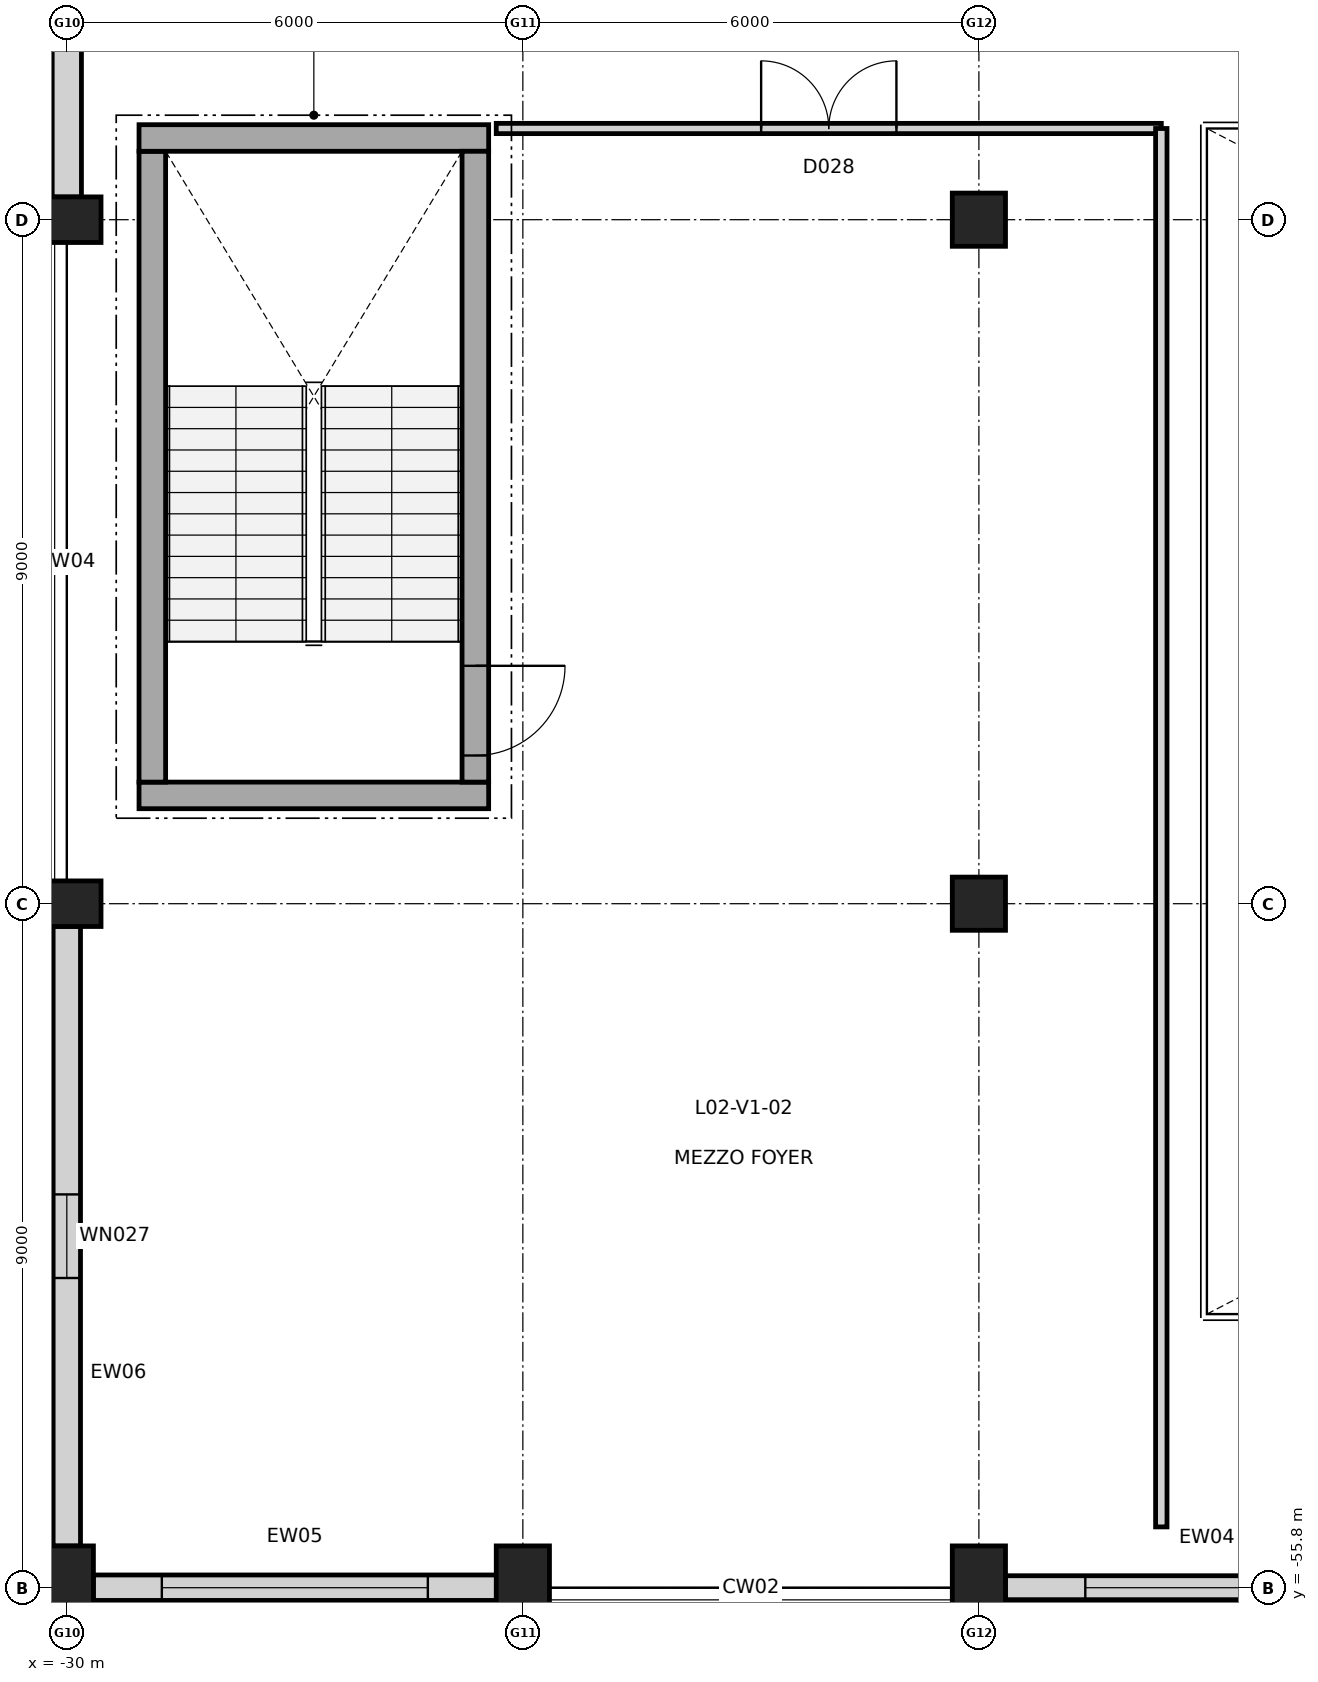
"""IFC4 building model, lengths in metres.
Left out: names, types, materials, properties, quantities, classifications, styles, units other than length and angle.
Written with IfcOpenShell. Run it as: python <this file> out.ifc"""

import sys

from ifc_helpers import new_model, si_unit, direction, frame, frame_2d, origin, origin_2d, place, context, subcontext, project, spatial, rectangle, circle, extrude, element, fill, save


model = new_model("IFC4")
c1 = context("Model", 3, precision=1e-05, world=origin(), true_north=direction((0.0, 1.0)))
c2 = subcontext(c1, "Body", "Model", "MODEL_VIEW")
j1 = project(units=[si_unit("LENGTHUNIT", "METRE"), si_unit("PLANEANGLEUNIT", "RADIAN")], contexts=[c1])
p1 = place(None, origin())
s1 = spatial("IfcSite", under=j1, at=p1, CompositionType="ELEMENT")
p2 = place(p1, origin())
s2 = spatial("IfcBuilding", under=s1, at=p2, CompositionType="ELEMENT")
p3 = place(p2, frame((0.0, 0.0, 10.2)))
s3 = spatial("IfcBuildingStorey", under=s2, at=p3, CompositionType="ELEMENT", Elevation=10.2)
p4 = place(p3, frame((-30.0, -55.8, 0.0), z_axis=(0.0, 0.0, 1.0), x_axis=(1.0, 0.0, 0.0)))
e1 = element("IfcColumn", 1, at=p4, inside=s3, PredefinedType="COLUMN", context=c2, shape_type="SweptSolid", body=[
    extrude(rectangle(XDim=0.7, YDim=1.1, at=origin_2d()), origin(), (0.0, 0.0, 1.0), 4.8),
])
for number, where, z_axis, x_axis in (
    (2, (-30.0, -46.8, 0.0), (0.0, 0.0, 1.0), (0.0, 1.0, 0.0)),
    (3, (-30.0, -37.8, 0.0), (0.0, 0.0, 1.0), (0.0, 1.0, 0.0)),
):
    element("IfcColumn", number, at=place(p3, frame(where, z_axis=z_axis, x_axis=x_axis)), inside=s3, PredefinedType="COLUMN", context=c2, shape_type="SweptSolid", body=[
        extrude(rectangle(XDim=0.6, YDim=0.9, at=origin_2d()), origin(), (0.0, 0.0, 1.0), 4.8),
    ])
for number, where, z_axis, x_axis in (
    (4, (-24.0, -55.8, 0.0), (0.0, 0.0, 1.0), (1.0, 0.0, 0.0)),
    (5, (-18.0, -55.8, 0.0), (0.0, 0.0, 1.0), (1.0, 0.0, 0.0)),
):
    element("IfcColumn", number, at=place(p3, frame(where, z_axis=z_axis, x_axis=x_axis)), inside=s3, PredefinedType="COLUMN", context=c2, shape_type="SweptSolid", body=[
        extrude(rectangle(XDim=0.7, YDim=1.1, at=origin_2d()), origin(), (0.0, 0.0, 1.0), 4.8),
    ])
for number, where, z_axis, x_axis in (
    (6, (-18.0, -46.8, 0.0), (0.0, 0.0, 1.0), (1.0, 0.0, 0.0)),
    (7, (-18.0, -37.8, 0.0), (0.0, 0.0, 1.0), (1.0, 0.0, 0.0)),
):
    element("IfcColumn", number, at=place(p3, frame(where, z_axis=z_axis, x_axis=x_axis)), inside=s3, PredefinedType="COLUMN", context=c2, shape_type="SweptSolid", body=[
        extrude(circle(Radius=0.35, at=origin_2d()), origin(), (0.0, 0.0, 1.0), 4.8),
    ])
p5 = place(p3, frame((-12.348, -55.8, 0.0), z_axis=(0.0, 0.0, 1.0), x_axis=(-1.0, 0.0, 0.0)))
e8 = element("IfcWall", 8, at=p5, inside=s3, PredefinedType="STANDARD", context=c2, shape_type="SweptSolid", body=[
    extrude(rectangle(XDim=5.304, YDim=0.315, at=frame_2d((2.652, 0.0))), origin(), (0.0, 0.0, 1.0), 3.745),
])
p6 = place(p5, frame((1.052, 0.0, 0.85)))
e9 = element("IfcOpeningElement", 9, at=p6, cuts=e8, PredefinedType="OPENING", context=c2, shape_type="SweptSolid", body=[
    extrude(rectangle(XDim=3.2, YDim=1.45, at=frame_2d((1.6, 0.725))), frame((0.0, 0.167, 0.0), z_axis=(0.0, -1.0, 0.0), x_axis=(1.0, 0.0, 0.0)), (0.0, 0.0, 1.0), 0.335),
])
p7 = place(p3, frame((-24.348, -55.8, 0.0), z_axis=(0.0, 0.0, 1.0), x_axis=(-1.0, 0.0, 0.0)))
e10 = element("IfcWall", 10, at=p7, inside=s3, PredefinedType="STANDARD", context=c2, shape_type="SweptSolid", body=[
    extrude(rectangle(XDim=5.304, YDim=0.335, at=frame_2d((2.652, 0.0))), origin(), (0.0, 0.0, 1.0), 3.745),
])
p8 = place(p7, frame((0.902, 0.0, 0.85)))
e11 = element("IfcOpeningElement", 11, at=p8, cuts=e10, PredefinedType="OPENING", context=c2, shape_type="SweptSolid", body=[
    extrude(rectangle(XDim=3.5, YDim=1.45, at=frame_2d((1.75, 0.725))), frame((0.0, 0.177, 0.0), z_axis=(0.0, -1.0, 0.0), x_axis=(1.0, 0.0, 0.0)), (0.0, 0.0, 1.0), 0.355),
])
p9 = place(p3, frame((-30.0, -55.252, 0.0), z_axis=(0.0, 0.0, 1.0), x_axis=(0.0, 1.0, 0.0)))
e12 = element("IfcWall", 12, at=p9, inside=s3, PredefinedType="STANDARD", context=c2, shape_type="SweptSolid", body=[
    extrude(rectangle(XDim=8.154, YDim=0.36, at=frame_2d((4.077, 0.0))), origin(), (0.0, 0.0, 1.0), 3.829),
])
p10 = place(p9, frame((3.527, 0.0, 0.85)))
e13 = element("IfcOpeningElement", 13, at=p10, cuts=e12, PredefinedType="OPENING", context=c2, shape_type="SweptSolid", body=[
    extrude(rectangle(XDim=1.1, YDim=1.6, at=frame_2d((0.55, 0.8))), frame((0.0, 0.19, 0.0), z_axis=(0.0, -1.0, 0.0), x_axis=(1.0, 0.0, 0.0)), (0.0, 0.0, 1.0), 0.38),
])
p11 = place(p3, frame((-30.0, -37.502, 0.0), z_axis=(0.0, 0.0, 1.0), x_axis=(0.0, 1.0, 0.0)))
e14 = element("IfcWall", 14, at=p11, inside=s3, PredefinedType="STANDARD", context=c2, shape_type="SweptSolid", body=[
    extrude(rectangle(XDim=8.404, YDim=0.385, at=frame_2d((4.202, 0.0))), origin(), (0.0, 0.0, 1.0), 3.829),
])
p12 = place(p11, frame((3.577, 0.0, 0.85)))
e15 = element("IfcOpeningElement", 15, at=p12, cuts=e14, PredefinedType="OPENING", context=c2, shape_type="SweptSolid", body=[
    extrude(rectangle(XDim=1.25, YDim=1.6, at=frame_2d((0.625, 0.8))), frame((0.0, 0.202, 0.0), z_axis=(0.0, -1.0, 0.0), x_axis=(1.0, 0.0, 0.0)), (0.0, 0.0, 1.0), 0.405),
])
p13 = place(p3, frame((-24.45, -45.375, 0.0), z_axis=(0.0, 0.0, 1.0), x_axis=(-1.0, 0.0, 0.0)))
e16 = element("IfcWall", 16, at=p13, inside=s3, PredefinedType="SHEAR", context=c2, shape_type="SweptSolid", body=[
    extrude(rectangle(XDim=4.6, YDim=0.35, at=frame_2d((2.3, 0.0))), origin(), (0.0, 0.0, 1.0), 4.8),
])
p14 = place(p3, frame((-28.875, -45.2, 0.0), z_axis=(0.0, 0.0, 1.0), x_axis=(0.0, 1.0, 0.0)))
e17 = element("IfcWall", 17, at=p14, inside=s3, PredefinedType="SHEAR", context=c2, shape_type="SweptSolid", body=[
    extrude(rectangle(XDim=8.3, YDim=0.35, at=frame_2d((4.15, 0.0))), origin(), (0.0, 0.0, 1.0), 4.8),
])
p15 = place(p3, frame((-29.05, -36.725, 0.0), z_axis=(0.0, 0.0, 1.0), x_axis=(1.0, 0.0, 0.0)))
e18 = element("IfcWall", 18, at=p15, inside=s3, PredefinedType="SHEAR", context=c2, shape_type="SweptSolid", body=[
    extrude(rectangle(XDim=4.6, YDim=0.35, at=frame_2d((2.3, 0.0))), origin(), (0.0, 0.0, 1.0), 4.8),
])
p16 = place(p3, frame((-24.625, -36.9, 0.0), z_axis=(0.0, 0.0, 1.0), x_axis=(0.0, -1.0, 0.0)))
e19 = element("IfcWall", 19, at=p16, inside=s3, PredefinedType="SHEAR", context=c2, shape_type="SweptSolid", body=[
    extrude(rectangle(XDim=8.3, YDim=0.35, at=frame_2d((4.15, 0.0))), origin(), (0.0, 0.0, 1.0), 4.8),
])
p17 = place(p16, frame((6.77, 0.0, 0.0)))
e20 = element("IfcOpeningElement", 20, at=p17, cuts=e19, PredefinedType="OPENING", context=c2, shape_type="SweptSolid", body=[
    extrude(rectangle(XDim=1.18, YDim=2.15, at=frame_2d((0.59, 1.075))), frame((0.0, 0.185, 0.0), z_axis=(0.0, -1.0, 0.0), x_axis=(1.0, 0.0, 0.0)), (0.0, 0.0, 1.0), 0.37),
])
p18 = place(p3, frame((-24.35, -36.6, 0.0), z_axis=(0.0, 0.0, 1.0), x_axis=(1.0, 0.0, 0.0)))
e21 = element("IfcWall", 21, at=p18, inside=s3, PredefinedType="PARTITIONING", context=c2, shape_type="SweptSolid", body=[
    extrude(rectangle(XDim=8.75, YDim=0.135, at=frame_2d((4.375, 0.0))), origin(), (0.0, 0.0, 1.0), 4.42),
])
p19 = place(p18, frame((3.485, 0.0, 0.0)))
e22 = element("IfcOpeningElement", 22, at=p19, cuts=e21, PredefinedType="OPENING", context=c2, shape_type="SweptSolid", body=[
    extrude(rectangle(XDim=1.78, YDim=2.3, at=frame_2d((0.89, 1.15))), frame((0.0, 0.077, 0.0), z_axis=(0.0, -1.0, 0.0), x_axis=(1.0, 0.0, 0.0)), (0.0, 0.0, 1.0), 0.155),
])
p20 = place(p3, frame((-15.6, -55.0, 0.0), z_axis=(0.0, 0.0, 1.0), x_axis=(0.0, 1.0, 0.0)))
e23 = element("IfcWall", 23, at=p20, inside=s3, PredefinedType="PARTITIONING", context=c2, shape_type="SweptSolid", body=[
    extrude(rectangle(XDim=18.4, YDim=0.15, at=frame_2d((9.2, 0.0))), origin(), (0.0, 0.0, 1.0), 4.42),
])
p21 = place(p6, origin())
e24 = element("IfcWindow", 24, at=p21, inside=s3, PartitioningType="SINGLE_PANEL", PredefinedType="WINDOW", context=c2, shape_type="SweptSolid", body=[
    extrude(rectangle(XDim=3.2, YDim=1.45, at=frame_2d((1.6, 0.725))), frame((0.0, 0.03, 0.0), z_axis=(0.0, -1.0, 0.0), x_axis=(1.0, 0.0, 0.0)), (0.0, 0.0, 1.0), 0.06),
])
fill(e9, e24)
p22 = place(p8, origin())
e25 = element("IfcWindow", 25, at=p22, inside=s3, PartitioningType="SINGLE_PANEL", PredefinedType="WINDOW", context=c2, shape_type="SweptSolid", body=[
    extrude(rectangle(XDim=3.5, YDim=1.45, at=frame_2d((1.75, 0.725))), frame((0.0, 0.03, 0.0), z_axis=(0.0, -1.0, 0.0), x_axis=(1.0, 0.0, 0.0)), (0.0, 0.0, 1.0), 0.06),
])
fill(e11, e25)
p23 = place(p10, origin())
e26 = element("IfcWindow", 26, at=p23, inside=s3, PartitioningType="SINGLE_PANEL", PredefinedType="WINDOW", context=c2, shape_type="SweptSolid", body=[
    extrude(rectangle(XDim=1.1, YDim=1.6, at=frame_2d((0.55, 0.8))), frame((0.0, 0.03, 0.0), z_axis=(0.0, -1.0, 0.0), x_axis=(1.0, 0.0, 0.0)), (0.0, 0.0, 1.0), 0.06),
])
fill(e13, e26)
p24 = place(p17, origin())
e27 = element("IfcDoor", 27, at=p24, inside=s3, OperationType="SINGLE_SWING_LEFT", PredefinedType="DOOR", context=c2, shape_type="SweptSolid", body=[
    extrude(rectangle(XDim=1.18, YDim=2.15, at=frame_2d((0.59, 1.075))), frame((0.0, 0.025, 0.0), z_axis=(0.0, -1.0, 0.0), x_axis=(1.0, 0.0, 0.0)), (0.0, 0.0, 1.0), 0.05),
])
fill(e20, e27)
p25 = place(p19, origin())
e28 = element("IfcDoor", 28, at=p25, inside=s3, OperationType="DOUBLE_DOOR_SINGLE_SWING", PredefinedType="DOOR", context=c2, shape_type="SweptSolid", body=[
    extrude(rectangle(XDim=1.78, YDim=2.3, at=frame_2d((0.89, 1.15))), frame((0.0, 0.025, 0.0), z_axis=(0.0, -1.0, 0.0), x_axis=(1.0, 0.0, 0.0)), (0.0, 0.0, 1.0), 0.05),
])
fill(e22, e28)
save(model, sys.argv[1])
